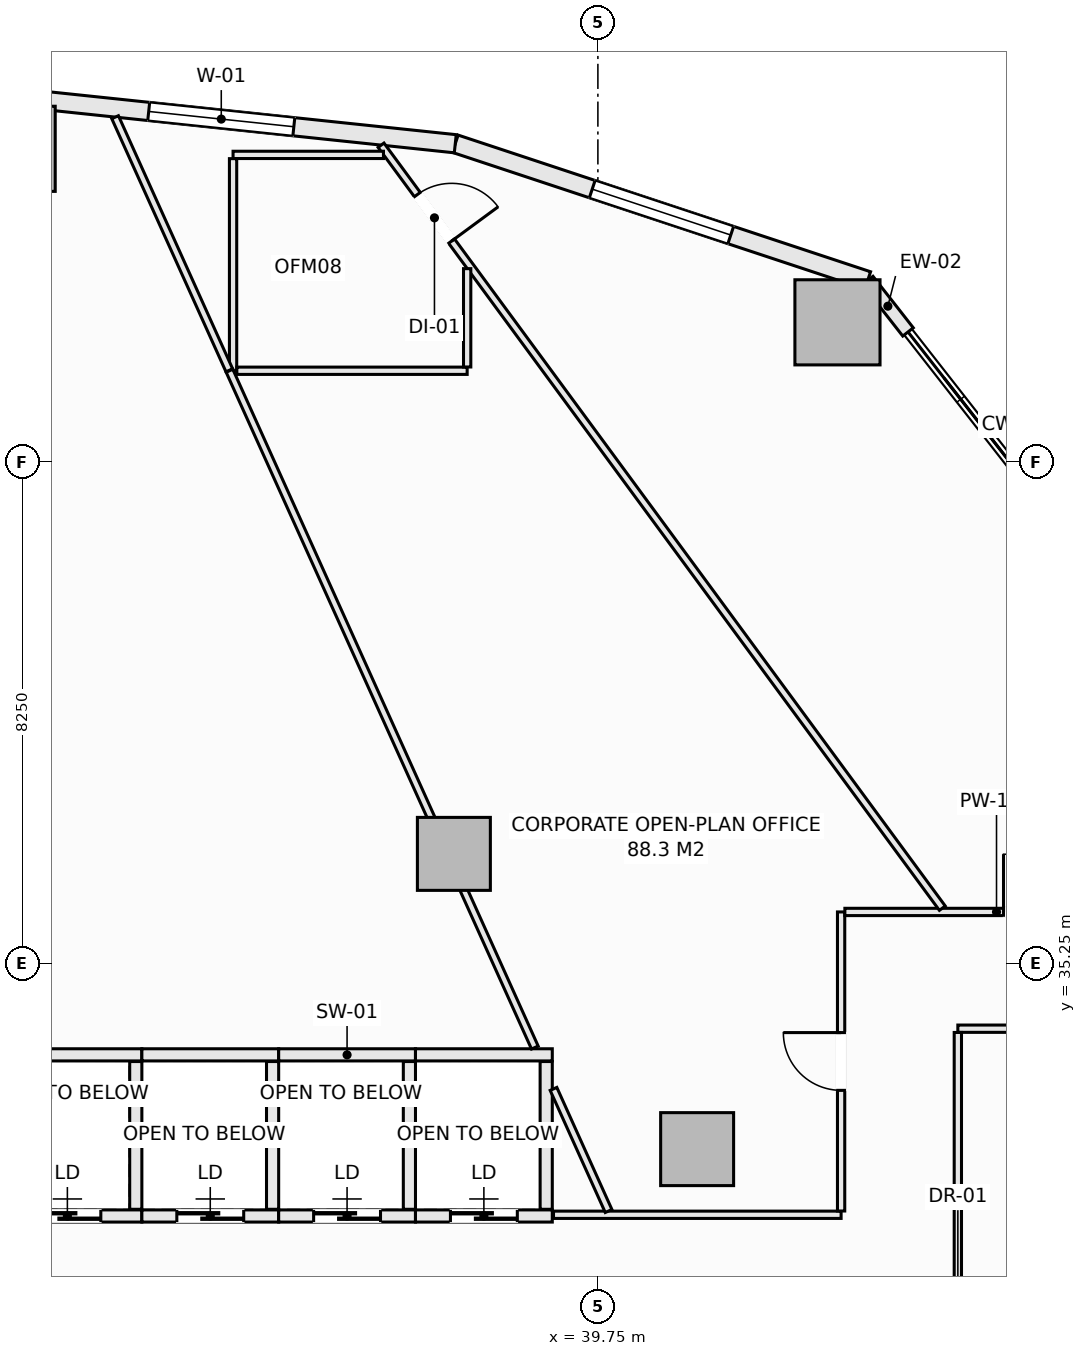
"""IFC4 building model, lengths in metres.
Left out: names, types, materials, properties, quantities, classifications, styles, units other than length and angle.
Written with IfcOpenShell. Run it as: python <this file> out.ifc"""

import sys

from ifc_helpers import new_model, si_unit, direction, frame, frame_2d, origin, origin_2d, place, context, subcontext, project, spatial, rectangle, extrude, element, fill, save


model = new_model("IFC4")
c1 = context("Model", 3, precision=1e-05, world=origin(), true_north=direction((0.0, 1.0)))
c2 = subcontext(c1, "Body", "Model", "MODEL_VIEW")
j1 = project(units=[si_unit("LENGTHUNIT", "METRE"), si_unit("PLANEANGLEUNIT", "RADIAN")], contexts=[c1])
p1 = place(None, origin())
s1 = spatial("IfcSite", under=j1, at=p1, CompositionType="ELEMENT")
p2 = place(p1, origin())
s2 = spatial("IfcBuilding", under=s1, at=p2, CompositionType="ELEMENT")
p3 = place(p2, frame((0.0, 0.0, 30.35)))
s3 = spatial("IfcBuildingStorey", under=s2, at=p3, CompositionType="ELEMENT", Elevation=30.35)
for number, where, z_axis, x_axis in (
    (1, (43.69, 45.796, -0.28), (0.0, 0.0, 1.0), (1.0, 0.0, 0.0)),
    (2, (30.125, 48.65, -0.28), (0.0, 0.0, 1.0), (1.0, 0.0, 0.0)),
):
    element("IfcColumn", number, at=place(p3, frame(where, z_axis=z_axis, x_axis=x_axis)), inside=s3, PredefinedType="COLUMN", context=c2, shape_type="SweptSolid", body=[
        extrude(rectangle(XDim=1.4, YDim=1.4, at=origin_2d()), origin(), (0.0, 0.0, 1.0), 3.85),
    ])
for number, where, z_axis, x_axis in (
    (3, (41.382, 32.199, -0.28), (0.0, 0.0, 1.0), (1.0, 0.0, 0.0)),
    (4, (37.382, 37.055, -0.28), (0.0, 0.0, 1.0), (1.0, 0.0, 0.0)),
):
    element("IfcColumn", number, at=place(p3, frame(where, z_axis=z_axis, x_axis=x_axis)), inside=s3, PredefinedType="COLUMN", context=c2, shape_type="SweptSolid", body=[
        extrude(rectangle(XDim=1.2, YDim=1.2, at=origin_2d()), origin(), (0.0, 0.0, 1.0), 3.85),
    ])
p4 = place(p3, frame((44.188, 46.486, 0.0), z_axis=(0.0, 0.0, 1.0), x_axis=(0.616387780378, -0.787442762492, 0.0)))
e5 = element("IfcWall", 5, at=p4, inside=s3, PredefinedType="SOLIDWALL", context=c2, shape_type="SweptSolid", body=[
    extrude(rectangle(XDim=1.076, YDim=0.22, at=frame_2d((0.538, 0.0))), origin(), (0.0, 0.0, 1.0), 3.093),
])
p5 = place(p3, frame((37.404, 48.733, 0.0), z_axis=(0.0, 0.0, 1.0), x_axis=(0.949238715533, -0.31455661006, 0.0)))
e6 = element("IfcWall", 6, at=p5, inside=s3, PredefinedType="SOLIDWALL", context=c2, shape_type="SweptSolid", body=[
    extrude(rectangle(XDim=7.146, YDim=0.3, at=frame_2d((3.573, 0.0))), origin(), (0.0, 0.0, 1.0), 3.093),
])
p6 = place(p5, frame((2.373, 0.0, 0.85)))
e7 = element("IfcOpeningElement", 7, at=p6, cuts=e6, PredefinedType="OPENING", context=c2, shape_type="SweptSolid", body=[
    extrude(rectangle(XDim=2.4, YDim=1.9, at=frame_2d((1.2, 0.95))), frame((0.0, 0.16, 0.0), z_axis=(0.0, -1.0, 0.0), x_axis=(1.0, 0.0, 0.0)), (0.0, 0.0, 1.0), 0.32),
])
p7 = place(p3, frame((30.125, 49.5, 0.0), z_axis=(0.0, 0.0, 1.0), x_axis=(0.994500334317, -0.104733399844, 0.0)))
e8 = element("IfcWall", 8, at=p7, inside=s3, PredefinedType="SOLIDWALL", context=c2, shape_type="SweptSolid", body=[
    extrude(rectangle(XDim=7.32, YDim=0.3, at=frame_2d((3.66, 0.0))), origin(), (0.0, 0.0, 1.0), 3.093),
])
p8 = place(p7, frame((2.25, 0.0, 0.85)))
e9 = element("IfcOpeningElement", 9, at=p8, cuts=e8, PredefinedType="OPENING", context=c2, shape_type="SweptSolid", body=[
    extrude(rectangle(XDim=2.4, YDim=1.9, at=frame_2d((1.2, 0.95))), frame((0.0, 0.16, 0.0), z_axis=(0.0, -1.0, 0.0), x_axis=(1.0, 0.0, 0.0)), (0.0, 0.0, 1.0), 0.32),
])
p9 = place(p3, frame((29.8, 33.75, 0.0), z_axis=(0.0, 0.0, 1.0), x_axis=(1.0, 0.0, 0.0)))
e10 = element("IfcWall", 10, at=p9, inside=s3, PredefinedType="SOLIDWALL", context=c2, shape_type="SweptSolid", body=[
    extrude(rectangle(XDim=2.45, YDim=0.2, at=frame_2d((1.225, 0.0))), origin(), (0.0, 0.0, 1.0), 3.57),
])
p10 = place(p3, frame((29.8, 31.1, 0.0), z_axis=(0.0, 0.0, 1.0), x_axis=(1.0, 0.0, 0.0)))
e11 = element("IfcWall", 11, at=p10, inside=s3, PredefinedType="SOLIDWALL", context=c2, shape_type="SweptSolid", body=[
    extrude(rectangle(XDim=2.45, YDim=0.2, at=frame_2d((1.225, 0.0))), origin(), (0.0, 0.0, 1.0), 3.57),
])
p11 = place(p10, frame((0.675, 0.0, 0.0)))
e12 = element("IfcOpeningElement", 12, at=p11, cuts=e11, PredefinedType="OPENING", context=c2, shape_type="SweptSolid", body=[
    extrude(rectangle(XDim=1.1, YDim=2.2, at=frame_2d((0.55, 1.1))), frame((0.0, 0.11, 0.0), z_axis=(0.0, -1.0, 0.0), x_axis=(1.0, 0.0, 0.0)), (0.0, 0.0, 1.0), 0.22),
])
p12 = place(p3, frame((32.15, 31.21, 0.0), z_axis=(0.0, 0.0, 1.0), x_axis=(0.0, 1.0, 0.0)))
e13 = element("IfcWall", 13, at=p12, inside=s3, PredefinedType="SOLIDWALL", context=c2, shape_type="SweptSolid", body=[
    extrude(rectangle(XDim=2.43, YDim=0.2, at=frame_2d((1.215, 0.0))), origin(), (0.0, 0.0, 1.0), 3.57),
])
p13 = place(p3, frame((32.25, 33.75, 0.0), z_axis=(0.0, 0.0, 1.0), x_axis=(1.0, 0.0, 0.0)))
e14 = element("IfcWall", 14, at=p13, inside=s3, PredefinedType="SOLIDWALL", context=c2, shape_type="SweptSolid", body=[
    extrude(rectangle(XDim=2.25, YDim=0.2, at=frame_2d((1.125, 0.0))), origin(), (0.0, 0.0, 1.0), 3.57),
])
p14 = place(p3, frame((32.25, 31.1, 0.0), z_axis=(0.0, 0.0, 1.0), x_axis=(1.0, 0.0, 0.0)))
e15 = element("IfcWall", 15, at=p14, inside=s3, PredefinedType="SOLIDWALL", context=c2, shape_type="SweptSolid", body=[
    extrude(rectangle(XDim=2.25, YDim=0.2, at=frame_2d((1.125, 0.0))), origin(), (0.0, 0.0, 1.0), 3.57),
])
p15 = place(p14, frame((0.575, 0.0, 0.0)))
e16 = element("IfcOpeningElement", 16, at=p15, cuts=e15, PredefinedType="OPENING", context=c2, shape_type="SweptSolid", body=[
    extrude(rectangle(XDim=1.1, YDim=2.2, at=frame_2d((0.55, 1.1))), frame((0.0, 0.11, 0.0), z_axis=(0.0, -1.0, 0.0), x_axis=(1.0, 0.0, 0.0)), (0.0, 0.0, 1.0), 0.22),
])
p16 = place(p3, frame((34.4, 31.21, 0.0), z_axis=(0.0, 0.0, 1.0), x_axis=(0.0, 1.0, 0.0)))
e17 = element("IfcWall", 17, at=p16, inside=s3, PredefinedType="SOLIDWALL", context=c2, shape_type="SweptSolid", body=[
    extrude(rectangle(XDim=2.43, YDim=0.2, at=frame_2d((1.215, 0.0))), origin(), (0.0, 0.0, 1.0), 3.57),
])
p17 = place(p3, frame((34.5, 33.75, 0.0), z_axis=(0.0, 0.0, 1.0), x_axis=(1.0, 0.0, 0.0)))
e18 = element("IfcWall", 18, at=p17, inside=s3, PredefinedType="SOLIDWALL", context=c2, shape_type="SweptSolid", body=[
    extrude(rectangle(XDim=2.25, YDim=0.2, at=frame_2d((1.125, 0.0))), origin(), (0.0, 0.0, 1.0), 3.57),
])
p18 = place(p3, frame((34.5, 31.1, 0.0), z_axis=(0.0, 0.0, 1.0), x_axis=(1.0, 0.0, 0.0)))
e19 = element("IfcWall", 19, at=p18, inside=s3, PredefinedType="SOLIDWALL", context=c2, shape_type="SweptSolid", body=[
    extrude(rectangle(XDim=2.25, YDim=0.2, at=frame_2d((1.125, 0.0))), origin(), (0.0, 0.0, 1.0), 3.57),
])
p19 = place(p18, frame((0.575, 0.0, 0.0)))
e20 = element("IfcOpeningElement", 20, at=p19, cuts=e19, PredefinedType="OPENING", context=c2, shape_type="SweptSolid", body=[
    extrude(rectangle(XDim=1.1, YDim=2.2, at=frame_2d((0.55, 1.1))), frame((0.0, 0.11, 0.0), z_axis=(0.0, -1.0, 0.0), x_axis=(1.0, 0.0, 0.0)), (0.0, 0.0, 1.0), 0.22),
])
p20 = place(p3, frame((36.65, 31.21, 0.0), z_axis=(0.0, 0.0, 1.0), x_axis=(0.0, 1.0, 0.0)))
e21 = element("IfcWall", 21, at=p20, inside=s3, PredefinedType="SOLIDWALL", context=c2, shape_type="SweptSolid", body=[
    extrude(rectangle(XDim=2.43, YDim=0.2, at=frame_2d((1.215, 0.0))), origin(), (0.0, 0.0, 1.0), 3.57),
])
p21 = place(p3, frame((36.75, 33.75, 0.0), z_axis=(0.0, 0.0, 1.0), x_axis=(1.0, 0.0, 0.0)))
e22 = element("IfcWall", 22, at=p21, inside=s3, PredefinedType="SOLIDWALL", context=c2, shape_type="SweptSolid", body=[
    extrude(rectangle(XDim=2.25, YDim=0.2, at=frame_2d((1.125, 0.0))), origin(), (0.0, 0.0, 1.0), 3.57),
])
p22 = place(p3, frame((36.75, 31.1, 0.0), z_axis=(0.0, 0.0, 1.0), x_axis=(1.0, 0.0, 0.0)))
e23 = element("IfcWall", 23, at=p22, inside=s3, PredefinedType="SOLIDWALL", context=c2, shape_type="SweptSolid", body=[
    extrude(rectangle(XDim=2.25, YDim=0.2, at=frame_2d((1.125, 0.0))), origin(), (0.0, 0.0, 1.0), 3.57),
])
p23 = place(p22, frame((0.575, 0.0, 0.0)))
e24 = element("IfcOpeningElement", 24, at=p23, cuts=e23, PredefinedType="OPENING", context=c2, shape_type="SweptSolid", body=[
    extrude(rectangle(XDim=1.1, YDim=2.2, at=frame_2d((0.55, 1.1))), frame((0.0, 0.11, 0.0), z_axis=(0.0, -1.0, 0.0), x_axis=(1.0, 0.0, 0.0)), (0.0, 0.0, 1.0), 0.22),
])
p24 = place(p3, frame((38.9, 31.21, 0.0), z_axis=(0.0, 0.0, 1.0), x_axis=(0.0, 1.0, 0.0)))
e25 = element("IfcWall", 25, at=p24, inside=s3, PredefinedType="SOLIDWALL", context=c2, shape_type="SweptSolid", body=[
    extrude(rectangle(XDim=2.43, YDim=0.2, at=frame_2d((1.215, 0.0))), origin(), (0.0, 0.0, 1.0), 3.57),
])
p25 = place(p3, frame((39.02, 31.12, 0.0), z_axis=(0.0, 0.0, 1.0), x_axis=(1.0, 0.0, 0.0)))
e26 = element("IfcWall", 26, at=p25, inside=s3, PredefinedType="PARTITIONING", context=c2, shape_type="SweptSolid", body=[
    extrude(rectangle(XDim=4.73, YDim=0.12, at=frame_2d((2.365, 0.0))), origin(), (0.0, 0.0, 1.0), 3.57),
])
p26 = place(p3, frame((43.75, 31.182, 0.0), z_axis=(0.0, 0.0, 1.0), x_axis=(0.0, 1.0, 0.0)))
e27 = element("IfcWall", 27, at=p26, inside=s3, PredefinedType="PARTITIONING", context=c2, shape_type="SweptSolid", body=[
    extrude(rectangle(XDim=4.918, YDim=0.12, at=frame_2d((2.459, 0.0))), origin(), (0.0, 0.0, 1.0), 3.57),
])
p27 = place(p26, frame((1.984, 0.0, 0.0)))
e28 = element("IfcOpeningElement", 28, at=p27, cuts=e27, PredefinedType="OPENING", context=c2, shape_type="SweptSolid", body=[
    extrude(rectangle(XDim=0.95, YDim=2.1, at=frame_2d((0.475, 1.05))), frame((0.0, 0.07, 0.0), z_axis=(0.0, -1.0, 0.0), x_axis=(1.0, 0.0, 0.0)), (0.0, 0.0, 1.0), 0.14),
])
p28 = place(p3, frame((43.812, 36.1, 0.0), z_axis=(0.0, 0.0, 1.0), x_axis=(1.0, 0.0, 0.0)))
e29 = element("IfcWall", 29, at=p28, inside=s3, PredefinedType="PARTITIONING", context=c2, shape_type="SweptSolid", body=[
    extrude(rectangle(XDim=4.988, YDim=0.12, at=frame_2d((2.494, 0.0))), origin(), (0.0, 0.0, 1.0), 3.57),
])
p29 = place(p28, frame((2.609, 0.0, 0.0)))
e30 = element("IfcOpeningElement", 30, at=p29, cuts=e29, PredefinedType="OPENING", context=c2, shape_type="SweptSolid", body=[
    extrude(rectangle(XDim=0.95, YDim=2.1, at=frame_2d((0.475, 1.05))), frame((0.0, 0.07, 0.0), z_axis=(0.0, -1.0, 0.0), x_axis=(1.0, 0.0, 0.0)), (0.0, 0.0, 1.0), 0.14),
])
p30 = place(p3, frame((45.67, 34.18, 0.0), z_axis=(0.0, 0.0, 1.0), x_axis=(1.0, 0.0, 0.0)))
e31 = element("IfcWall", 31, at=p30, inside=s3, PredefinedType="PARTITIONING", context=c2, shape_type="SweptSolid", body=[
    extrude(rectangle(XDim=3.068, YDim=0.12, at=frame_2d((1.534, 0.0))), origin(), (0.0, 0.0, 1.0), 3.205),
])
p31 = place(p3, frame((45.67, 19.32, 0.0), z_axis=(0.0, 0.0, 1.0), x_axis=(0.0, 1.0, 0.0)))
e32 = element("IfcWall", 32, at=p31, inside=s3, PredefinedType="PARTITIONING", context=c2, shape_type="SweptSolid", body=[
    extrude(rectangle(XDim=14.798, YDim=0.12, at=frame_2d((7.399, 0.0))), origin(), (0.0, 0.0, 1.0), 3.57),
])
p32 = place(p31, frame((9.798, 0.0, 0.0)))
e33 = element("IfcOpeningElement", 33, at=p32, cuts=e32, PredefinedType="OPENING", context=c2, shape_type="SweptSolid", body=[
    extrude(rectangle(XDim=0.95, YDim=2.1, at=frame_2d((0.475, 1.05))), frame((0.0, 0.07, 0.0), z_axis=(0.0, -1.0, 0.0), x_axis=(1.0, 0.0, 0.0)), (0.0, 0.0, 1.0), 0.14),
])
p33 = place(p3, frame((36.184, 48.709, 0.0), z_axis=(0.0, 0.0, 1.0), x_axis=(0.592622013748, -0.805480694257, 0.0)))
e34 = element("IfcWall", 34, at=p33, inside=s3, PredefinedType="PARTITIONING", context=c2, shape_type="SweptSolid", body=[
    extrude(rectangle(XDim=15.577, YDim=0.12, at=frame_2d((7.789, 0.0))), origin(), (0.0, 0.0, 1.0), 3.57),
])
p34 = place(p33, frame((1.008, 0.0, 0.0)))
e35 = element("IfcOpeningElement", 35, at=p34, cuts=e34, PredefinedType="OPENING", context=c2, shape_type="SweptSolid", body=[
    extrude(rectangle(XDim=0.95, YDim=2.1, at=frame_2d((0.475, 1.05))), frame((0.0, 0.07, 0.0), z_axis=(0.0, -1.0, 0.0), x_axis=(1.0, 0.0, 0.0)), (0.0, 0.0, 1.0), 0.14),
])
p35 = place(p3, frame((33.75, 48.55, 0.0), z_axis=(0.0, 0.0, 1.0), x_axis=(1.0, 0.0, 0.0)))
e36 = element("IfcWall", 36, at=p35, inside=s3, PredefinedType="PARTITIONING", context=c2, shape_type="SweptSolid", body=[
    extrude(rectangle(XDim=2.473, YDim=0.12, at=frame_2d((1.237, 0.0))), origin(), (0.0, 0.0, 1.0), 3.57),
])
p36 = place(p3, frame((33.75, 45.0, 0.0), z_axis=(0.0, 0.0, 1.0), x_axis=(0.0, 1.0, 0.0)))
e37 = element("IfcWall", 37, at=p36, inside=s3, PredefinedType="PARTITIONING", context=c2, shape_type="SweptSolid", body=[
    extrude(rectangle(XDim=3.488, YDim=0.12, at=frame_2d((1.744, 0.0))), origin(), (0.0, 0.0, 1.0), 3.57),
])
p37 = place(p3, frame((33.812, 45.0, 0.0), z_axis=(0.0, 0.0, 1.0), x_axis=(1.0, 0.0, 0.0)))
e38 = element("IfcWall", 38, at=p37, inside=s3, PredefinedType="PARTITIONING", context=c2, shape_type="SweptSolid", body=[
    extrude(rectangle(XDim=3.788, YDim=0.12, at=frame_2d((1.894, 0.0))), origin(), (0.0, 0.0, 1.0), 3.57),
])
p38 = place(p3, frame((37.6, 45.062, 0.0), z_axis=(0.0, 0.0, 1.0), x_axis=(0.0, 1.0, 0.0)))
e39 = element("IfcWall", 39, at=p38, inside=s3, PredefinedType="PARTITIONING", context=c2, shape_type="SweptSolid", body=[
    extrude(rectangle(XDim=1.617, YDim=0.12, at=frame_2d((0.809, 0.0))), origin(), (0.0, 0.0, 1.0), 3.57),
])
p39 = place(p3, frame((31.81, 49.17, 0.0), z_axis=(0.0, 0.0, 1.0), x_axis=(0.411275866603, -0.911510922343, 0.0)))
e40 = element("IfcWall", 40, at=p39, inside=s3, PredefinedType="PARTITIONING", context=c2, shape_type="SweptSolid", body=[
    extrude(rectangle(XDim=4.567, YDim=0.12, at=frame_2d((2.283, 0.0))), origin(), (0.0, 0.0, 1.0), 3.57),
])
p40 = place(p3, frame((33.691, 45.0, 0.0), z_axis=(0.0, 0.0, 1.0), x_axis=(0.411269013058, -0.911514014647, 0.0)))
e41 = element("IfcWall", 41, at=p40, inside=s3, PredefinedType="PARTITIONING", context=c2, shape_type="SweptSolid", body=[
    extrude(rectangle(XDim=12.21, YDim=0.12, at=frame_2d((6.105, 0.0))), origin(), (0.0, 0.0, 1.0), 2.934),
])
p41 = place(p3, frame((39.02, 33.19, 0.0), z_axis=(0.0, 0.0, 1.0), x_axis=(0.411263040548, -0.91151670938, 0.0)))
e42 = element("IfcWall", 42, at=p41, inside=s3, PredefinedType="PARTITIONING", context=c2, shape_type="SweptSolid", body=[
    extrude(rectangle(XDim=2.203, YDim=0.12, at=frame_2d((1.102, 0.0))), origin(), (0.0, 0.0, 1.0), 3.57),
])
p42 = place(p6, origin())
e43 = element("IfcWindow", 43, at=p42, inside=s3, PartitioningType="SINGLE_PANEL", PredefinedType="WINDOW", context=c2, shape_type="SweptSolid", body=[
    extrude(rectangle(XDim=2.4, YDim=1.9, at=frame_2d((1.2, 0.95))), frame((0.0, 0.03, 0.0), z_axis=(0.0, -1.0, 0.0), x_axis=(1.0, 0.0, 0.0)), (0.0, 0.0, 1.0), 0.06),
])
fill(e7, e43)
p43 = place(p8, origin())
e44 = element("IfcWindow", 44, at=p43, inside=s3, PartitioningType="SINGLE_PANEL", PredefinedType="WINDOW", context=c2, shape_type="SweptSolid", body=[
    extrude(rectangle(XDim=2.4, YDim=1.9, at=frame_2d((1.2, 0.95))), frame((0.0, 0.03, 0.0), z_axis=(0.0, -1.0, 0.0), x_axis=(1.0, 0.0, 0.0)), (0.0, 0.0, 1.0), 0.06),
])
fill(e9, e44)
p44 = place(p11, origin())
e45 = element("IfcDoor", 45, at=p44, inside=s3, OperationType="SLIDING_TO_LEFT", PredefinedType="DOOR", context=c2, shape_type="SweptSolid", body=[
    extrude(rectangle(XDim=1.1, YDim=2.2, at=frame_2d((0.55, 1.1))), frame((0.0, 0.025, 0.0), z_axis=(0.0, -1.0, 0.0), x_axis=(1.0, 0.0, 0.0)), (0.0, 0.0, 1.0), 0.05),
])
fill(e12, e45)
p45 = place(p15, origin())
e46 = element("IfcDoor", 46, at=p45, inside=s3, OperationType="SLIDING_TO_LEFT", PredefinedType="DOOR", context=c2, shape_type="SweptSolid", body=[
    extrude(rectangle(XDim=1.1, YDim=2.2, at=frame_2d((0.55, 1.1))), frame((0.0, 0.025, 0.0), z_axis=(0.0, -1.0, 0.0), x_axis=(1.0, 0.0, 0.0)), (0.0, 0.0, 1.0), 0.05),
])
fill(e16, e46)
p46 = place(p19, origin())
e47 = element("IfcDoor", 47, at=p46, inside=s3, OperationType="SLIDING_TO_LEFT", PredefinedType="DOOR", context=c2, shape_type="SweptSolid", body=[
    extrude(rectangle(XDim=1.1, YDim=2.2, at=frame_2d((0.55, 1.1))), frame((0.0, 0.025, 0.0), z_axis=(0.0, -1.0, 0.0), x_axis=(1.0, 0.0, 0.0)), (0.0, 0.0, 1.0), 0.05),
])
fill(e20, e47)
p47 = place(p23, origin())
e48 = element("IfcDoor", 48, at=p47, inside=s3, OperationType="SLIDING_TO_LEFT", PredefinedType="DOOR", context=c2, shape_type="SweptSolid", body=[
    extrude(rectangle(XDim=1.1, YDim=2.2, at=frame_2d((0.55, 1.1))), frame((0.0, 0.025, 0.0), z_axis=(0.0, -1.0, 0.0), x_axis=(1.0, 0.0, 0.0)), (0.0, 0.0, 1.0), 0.05),
])
fill(e24, e48)
p48 = place(p29, origin())
e49 = element("IfcDoor", 49, at=p48, inside=s3, OperationType="SINGLE_SWING_LEFT", PredefinedType="DOOR", context=c2, shape_type="SweptSolid", body=[
    extrude(rectangle(XDim=0.95, YDim=2.1, at=frame_2d((0.475, 1.05))), frame((0.0, 0.025, 0.0), z_axis=(0.0, -1.0, 0.0), x_axis=(1.0, 0.0, 0.0)), (0.0, 0.0, 1.0), 0.05),
])
fill(e30, e49)
p49 = place(p27, origin())
e50 = element("IfcDoor", 50, at=p49, inside=s3, OperationType="SINGLE_SWING_RIGHT", PredefinedType="DOOR", context=c2, shape_type="SweptSolid", body=[
    extrude(rectangle(XDim=0.95, YDim=2.1, at=frame_2d((0.475, 1.05))), frame((0.0, 0.025, 0.0), z_axis=(0.0, -1.0, 0.0), x_axis=(1.0, 0.0, 0.0)), (0.0, 0.0, 1.0), 0.05),
])
fill(e28, e50)
p50 = place(p34, origin())
e51 = element("IfcDoor", 51, at=p50, inside=s3, OperationType="SINGLE_SWING_RIGHT", PredefinedType="DOOR", context=c2, shape_type="SweptSolid", body=[
    extrude(rectangle(XDim=0.95, YDim=2.1, at=frame_2d((0.475, 1.05))), frame((0.0, 0.025, 0.0), z_axis=(0.0, -1.0, 0.0), x_axis=(1.0, 0.0, 0.0)), (0.0, 0.0, 1.0), 0.05),
])
fill(e35, e51)
save(model, sys.argv[1])
